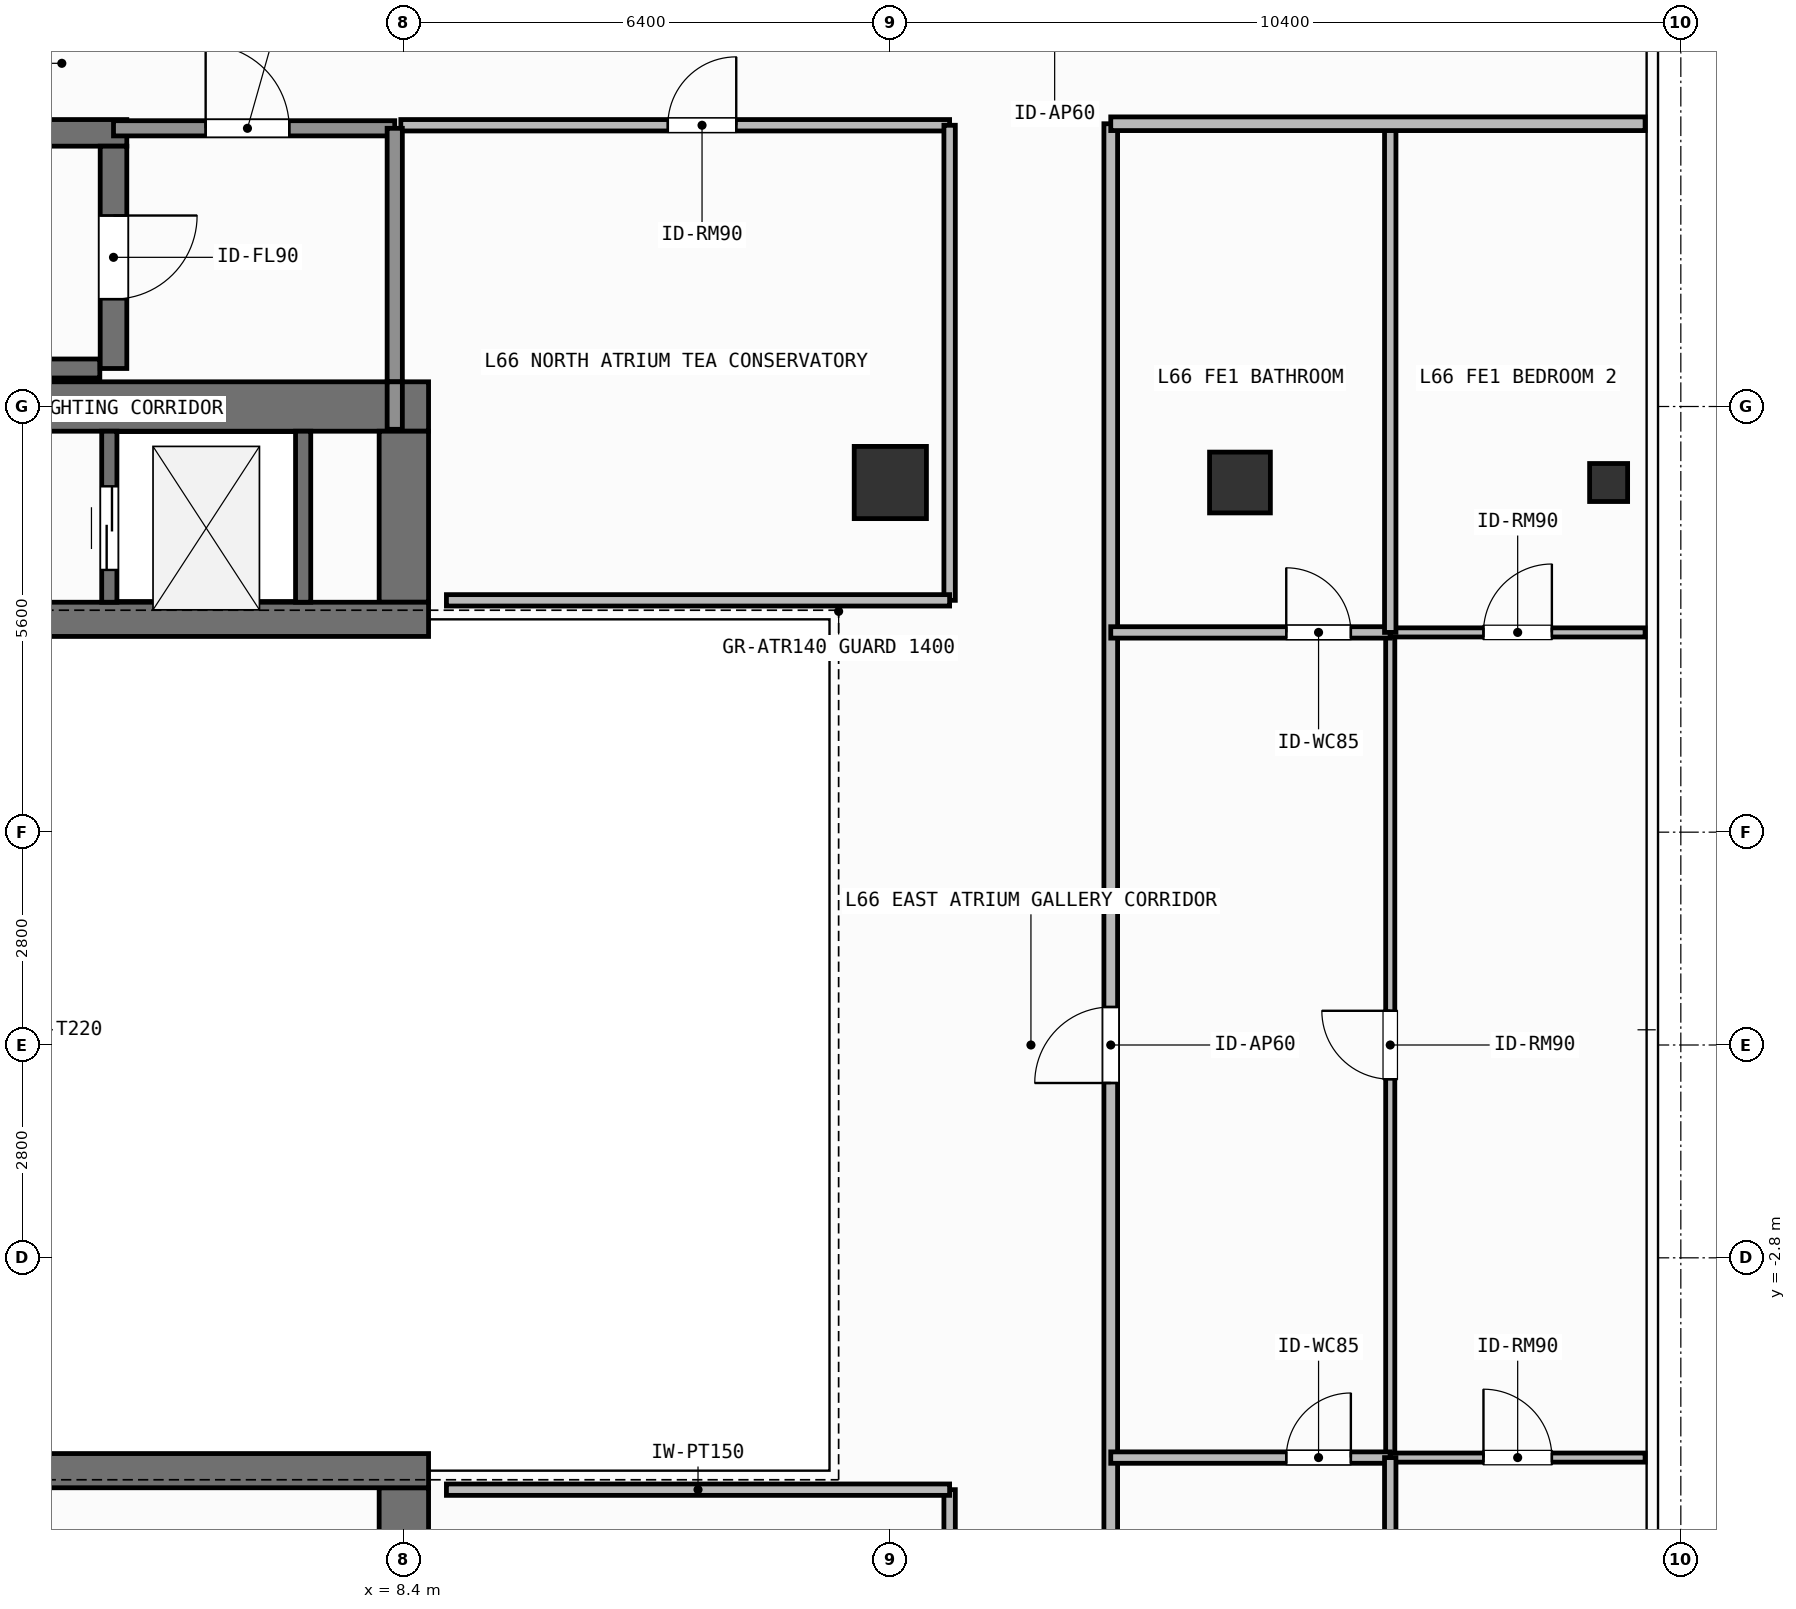
"""IFC4 building model, lengths in metres.
Left out: names, types, materials, properties, quantities, classifications, styles, units other than length and angle.
Written with IfcOpenShell. Run it as: python <this file> out.ifc"""

import sys

from ifc_helpers import new_model, si_unit, direction, frame, frame_2d, origin, origin_2d, place, context, subcontext, project, spatial, rectangle, hollow_rectangle, extrude, element, fill, save


model = new_model("IFC4")
c1 = context("Model", 3, precision=1e-05, world=origin(), true_north=direction((0.0, 1.0)))
c2 = subcontext(c1, "Body", "Model", "MODEL_VIEW")
j1 = project(units=[si_unit("LENGTHUNIT", "METRE"), si_unit("PLANEANGLEUNIT", "RADIAN")], contexts=[c1])
p1 = place(None, origin())
s1 = spatial("IfcSite", under=j1, at=p1, CompositionType="ELEMENT")
p2 = place(p1, origin())
s2 = spatial("IfcBuilding", under=s1, at=p2, CompositionType="ELEMENT")
p3 = place(p2, frame((0.0, 0.0, 270.3)))
s3 = spatial("IfcBuildingStorey", under=s2, at=p3, CompositionType="ELEMENT", Elevation=270.3)
p4 = place(p3, frame((-7.55, 8.4, 0.0), z_axis=(0.0, 0.0, 1.0), x_axis=(1.0, 0.0, 0.0)))
e1 = element("IfcWall", 1, at=p4, inside=s3, PredefinedType="SHEAR", context=c2, shape_type="SweptSolid", body=[
    extrude(rectangle(XDim=16.275, YDim=0.65, at=frame_2d((8.138, 0.0))), origin(), (0.0, 0.0, 1.0), 3.9),
])
for number, where, z_axis, x_axis in (
    (2, (8.4, -8.075, 0.0), (0.0, 0.0, 1.0), (0.0, 1.0, 0.0)),
    (3, (8.4, 5.825, 0.0), (0.0, 0.0, 1.0), (0.0, 1.0, 0.0)),
):
    element("IfcWall", number, at=place(p3, frame(where, z_axis=z_axis, x_axis=x_axis)), inside=s3, PredefinedType="SHEAR", context=c2, shape_type="SweptSolid", body=[
        extrude(rectangle(XDim=2.25, YDim=0.65, at=frame_2d((1.125, 0.0))), origin(), (0.0, 0.0, 1.0), 3.9),
    ])
for number, where, z_axis, x_axis in (
    (4, (3.045, -5.6, 0.0), (0.0, 0.0, 1.0), (1.0, 0.0, 0.0)),
    (5, (3.045, 5.6, 0.0), (0.0, 0.0, 1.0), (1.0, 0.0, 0.0)),
):
    element("IfcWall", number, at=place(p3, frame(where, z_axis=z_axis, x_axis=x_axis)), inside=s3, PredefinedType="SHEAR", context=c2, shape_type="SweptSolid", body=[
        extrude(rectangle(XDim=5.68, YDim=0.45, at=frame_2d((2.84, 0.0))), origin(), (0.0, 0.0, 1.0), 3.9),
    ])
p5 = place(p3, frame((-2.555, 12.0, 0.0), z_axis=(0.0, 0.0, 1.0), x_axis=(1.0, 0.0, 0.0)))
e6 = element("IfcWall", 6, at=p5, inside=s3, PredefinedType="SHEAR", context=c2, shape_type="SweptSolid", body=[
    extrude(rectangle(XDim=7.31, YDim=0.35, at=frame_2d((3.655, 0.0))), origin(), (0.0, 0.0, 1.0), 3.9),
])
p6 = place(p3, frame((-2.2, 8.9, 0.0), z_axis=(0.0, 0.0, 1.0), x_axis=(1.0, 0.0, 0.0)))
e7 = element("IfcWall", 7, at=p6, inside=s3, PredefinedType="SHEAR", context=c2, shape_type="SweptSolid", body=[
    extrude(rectangle(XDim=6.6, YDim=0.25, at=frame_2d((3.3, 0.0))), origin(), (0.0, 0.0, 1.0), 3.9),
])
p7 = place(p3, frame((4.58, 11.825, 0.0), z_axis=(0.0, 0.0, 1.0), x_axis=(0.0, -1.0, 0.0)))
e8 = element("IfcWall", 8, at=p7, inside=s3, PredefinedType="SHEAR", context=c2, shape_type="SweptSolid", body=[
    extrude(rectangle(XDim=2.925, YDim=0.35, at=frame_2d((1.462, 0.0))), origin(), (0.0, 0.0, 1.0), 3.9),
])
p8 = place(p7, frame((0.913, 0.0, 0.0)))
e9 = element("IfcOpeningElement", 9, at=p8, cuts=e8, PredefinedType="OPENING", context=c2, shape_type="SweptSolid", body=[
    extrude(rectangle(XDim=1.1, YDim=2.15, at=frame_2d((0.55, 1.075))), frame((0.0, 0.185, 0.0), z_axis=(0.0, -1.0, 0.0), x_axis=(1.0, 0.0, 0.0)), (0.0, 0.0, 1.0), 0.37),
])
p9 = place(p3, frame((14.8, 7.4, 0.0), z_axis=(0.0, 0.0, 1.0), x_axis=(1.0, 0.0, 0.0)))
e10 = element("IfcColumn", 10, at=p9, inside=s3, PredefinedType="COLUMN", context=c2, shape_type="SweptSolid", body=[
    extrude(rectangle(XDim=0.95, YDim=0.95, at=origin_2d()), origin(), (0.0, 0.0, 1.0), 3.9),
])
p10 = place(p3, frame((19.4, 7.4, 0.0), z_axis=(0.0, 0.0, 1.0), x_axis=(1.0, 0.0, 0.0)))
e11 = element("IfcColumn", 11, at=p10, inside=s3, PredefinedType="COLUMN", context=c2, shape_type="SweptSolid", body=[
    extrude(hollow_rectangle(XDim=0.8, YDim=0.8, WallThickness=0.036, at=origin_2d()), origin(), (0.0, 0.0, 1.0), 3.9),
])
p11 = place(p3, frame((24.25, 7.4, 0.0), z_axis=(0.0, 0.0, 1.0), x_axis=(1.0, 0.0, 0.0)))
e12 = element("IfcColumn", 12, at=p11, inside=s3, PredefinedType="COLUMN", context=c2, shape_type="SweptSolid", body=[
    extrude(hollow_rectangle(XDim=0.5, YDim=0.5, WallThickness=0.025, at=origin_2d()), origin(), (0.0, 0.0, 1.0), 3.9),
])
p12 = place(p3, frame((4.525, 5.825, 0.0), z_axis=(0.0, 0.0, 1.0), x_axis=(0.0, 1.0, 0.0)))
e13 = element("IfcWall", 13, at=p12, inside=s3, PredefinedType="SHEAR", context=c2, shape_type="SweptSolid", body=[
    extrude(rectangle(XDim=2.25, YDim=0.2, at=frame_2d((1.125, 0.0))), origin(), (0.0, 0.0, 1.0), 3.68),
])
p13 = place(p12, frame((0.425, 0.0, 0.0)))
e14 = element("IfcOpeningElement", 14, at=p13, cuts=e13, PredefinedType="OPENING", context=c2, shape_type="SweptSolid", body=[
    extrude(rectangle(XDim=1.1, YDim=2.2, at=frame_2d((0.55, 1.1))), frame((0.0, 0.11, 0.0), z_axis=(0.0, -1.0, 0.0), x_axis=(1.0, 0.0, 0.0)), (0.0, 0.0, 1.0), 0.22),
])
p14 = place(p3, frame((7.075, 5.825, 0.0), z_axis=(0.0, 0.0, 1.0), x_axis=(0.0, 1.0, 0.0)))
e15 = element("IfcWall", 15, at=p14, inside=s3, PredefinedType="SHEAR", context=c2, shape_type="SweptSolid", body=[
    extrude(rectangle(XDim=2.25, YDim=0.2, at=frame_2d((1.125, 0.0))), origin(), (0.0, 0.0, 1.0), 3.68),
])
p15 = place(p3, frame((4.58, 12.06, 0.0), z_axis=(0.0, 0.0, 1.0), x_axis=(1.0, 0.0, 0.0)))
e16 = element("IfcWall", 16, at=p15, inside=s3, PredefinedType="SOLIDWALL", context=c2, shape_type="SweptSolid", body=[
    extrude(rectangle(XDim=3.7, YDim=0.2, at=frame_2d((1.85, 0.0))), origin(), (0.0, 0.0, 1.0), 3.68),
])
p16 = place(p15, frame((1.212, 0.0, 0.0)))
e17 = element("IfcOpeningElement", 17, at=p16, cuts=e16, PredefinedType="OPENING", context=c2, shape_type="SweptSolid", body=[
    extrude(rectangle(XDim=1.1, YDim=2.15, at=frame_2d((0.55, 1.075))), frame((0.0, 0.11, 0.0), z_axis=(0.0, -1.0, 0.0), x_axis=(1.0, 0.0, 0.0)), (0.0, 0.0, 1.0), 0.22),
])
p17 = place(p3, frame((8.36, 12.1, 0.0), z_axis=(0.0, 0.0, 1.0), x_axis=(1.0, 0.0, 0.0)))
e18 = element("IfcWall", 18, at=p17, inside=s3, PredefinedType="PARTITIONING", context=c2, shape_type="SweptSolid", body=[
    extrude(rectangle(XDim=7.22, YDim=0.15, at=frame_2d((3.61, 0.0))), origin(), (0.0, 0.0, 1.0), 3.68),
])
p18 = place(p17, frame((3.513, 0.0, 0.0)))
e19 = element("IfcOpeningElement", 19, at=p18, cuts=e18, PredefinedType="OPENING", context=c2, shape_type="SweptSolid", body=[
    extrude(rectangle(XDim=0.9, YDim=2.1, at=frame_2d((0.45, 1.05))), frame((0.0, 0.085, 0.0), z_axis=(0.0, -1.0, 0.0), x_axis=(1.0, 0.0, 0.0)), (0.0, 0.0, 1.0), 0.17),
])
p19 = place(p3, frame((17.7, -12.12, 0.0), z_axis=(0.0, 0.0, 1.0), x_axis=(0.0, 1.0, 0.0)))
e20 = element("IfcWall", 20, at=p19, inside=s3, PredefinedType="PARTITIONING", context=c2, shape_type="SweptSolid", body=[
    extrude(rectangle(XDim=24.24, YDim=0.18, at=frame_2d((12.12, 0.0))), origin(), (0.0, 0.0, 1.0), 3.68),
])
p20 = place(p19, frame((11.62, 0.0, 0.0)))
e21 = element("IfcOpeningElement", 21, at=p20, cuts=e20, PredefinedType="OPENING", context=c2, shape_type="SweptSolid", body=[
    extrude(rectangle(XDim=1.0, YDim=2.2, at=frame_2d((0.5, 1.1))), frame((0.0, 0.1, 0.0), z_axis=(0.0, -1.0, 0.0), x_axis=(1.0, 0.0, 0.0)), (0.0, 0.0, 1.0), 0.2),
])
p21 = place(p3, frame((21.377, -5.428, 0.0), z_axis=(0.0, 0.0, 1.0), x_axis=(0.0, 1.0, 0.0)))
e22 = element("IfcWall", 22, at=p21, inside=s3, PredefinedType="PARTITIONING", context=c2, shape_type="SweptSolid", body=[
    extrude(rectangle(XDim=10.856, YDim=0.12, at=frame_2d((5.428, 0.0))), origin(), (0.0, 0.0, 1.0), 3.68),
])
p22 = place(p21, frame((4.978, 0.0, 0.0)))
e23 = element("IfcOpeningElement", 23, at=p22, cuts=e22, PredefinedType="OPENING", context=c2, shape_type="SweptSolid", body=[
    extrude(rectangle(XDim=0.9, YDim=2.1, at=frame_2d((0.45, 1.05))), frame((0.0, 0.07, 0.0), z_axis=(0.0, -1.0, 0.0), x_axis=(1.0, 0.0, 0.0)), (0.0, 0.0, 1.0), 0.14),
])
p23 = place(p3, frame((17.7, 5.428, 0.0), z_axis=(0.0, 0.0, 1.0), x_axis=(1.0, 0.0, 0.0)))
e24 = element("IfcWall", 24, at=p23, inside=s3, PredefinedType="PARTITIONING", context=c2, shape_type="SweptSolid", body=[
    extrude(rectangle(XDim=3.677, YDim=0.15, at=frame_2d((1.838, 0.0))), origin(), (0.0, 0.0, 1.0), 3.68),
])
p24 = place(p23, frame((2.309, 0.0, 0.0)))
e25 = element("IfcOpeningElement", 25, at=p24, cuts=e24, PredefinedType="OPENING", context=c2, shape_type="SweptSolid", body=[
    extrude(rectangle(XDim=0.85, YDim=2.1, at=frame_2d((0.425, 1.05))), frame((0.0, 0.085, 0.0), z_axis=(0.0, -1.0, 0.0), x_axis=(1.0, 0.0, 0.0)), (0.0, 0.0, 1.0), 0.17),
])
p25 = place(p3, frame((17.7, -5.428, 0.0), z_axis=(0.0, 0.0, 1.0), x_axis=(1.0, 0.0, 0.0)))
e26 = element("IfcWall", 26, at=p25, inside=s3, PredefinedType="PARTITIONING", context=c2, shape_type="SweptSolid", body=[
    extrude(rectangle(XDim=3.677, YDim=0.15, at=frame_2d((1.838, 0.0))), origin(), (0.0, 0.0, 1.0), 3.68),
])
p26 = place(p25, frame((2.309, 0.0, 0.0)))
e27 = element("IfcOpeningElement", 27, at=p26, cuts=e26, PredefinedType="OPENING", context=c2, shape_type="SweptSolid", body=[
    extrude(rectangle(XDim=0.85, YDim=2.1, at=frame_2d((0.425, 1.05))), frame((0.0, 0.085, 0.0), z_axis=(0.0, -1.0, 0.0), x_axis=(1.0, 0.0, 0.0)), (0.0, 0.0, 1.0), 0.17),
])
p27 = place(p3, frame((21.377, -5.428, 0.0), z_axis=(0.0, 0.0, 1.0), x_axis=(1.0, 0.0, 0.0)))
e28 = element("IfcWall", 28, at=p27, inside=s3, PredefinedType="PARTITIONING", context=c2, shape_type="SweptSolid", body=[
    extrude(rectangle(XDim=3.353, YDim=0.12, at=frame_2d((1.677, 0.0))), origin(), (0.0, 0.0, 1.0), 3.68),
])
p28 = place(p27, frame((1.227, 0.0, 0.0)))
e29 = element("IfcOpeningElement", 29, at=p28, cuts=e28, PredefinedType="OPENING", context=c2, shape_type="SweptSolid", body=[
    extrude(rectangle(XDim=0.9, YDim=2.1, at=frame_2d((0.45, 1.05))), frame((0.0, 0.07, 0.0), z_axis=(0.0, -1.0, 0.0), x_axis=(1.0, 0.0, 0.0)), (0.0, 0.0, 1.0), 0.14),
])
p29 = place(p3, frame((21.377, 5.428, 0.0), z_axis=(0.0, 0.0, 1.0), x_axis=(1.0, 0.0, 0.0)))
e30 = element("IfcWall", 30, at=p29, inside=s3, PredefinedType="PARTITIONING", context=c2, shape_type="SweptSolid", body=[
    extrude(rectangle(XDim=3.353, YDim=0.12, at=frame_2d((1.677, 0.0))), origin(), (0.0, 0.0, 1.0), 3.68),
])
p30 = place(p29, frame((1.227, 0.0, 0.0)))
e31 = element("IfcOpeningElement", 31, at=p30, cuts=e30, PredefinedType="OPENING", context=c2, shape_type="SweptSolid", body=[
    extrude(rectangle(XDim=0.9, YDim=2.1, at=frame_2d((0.45, 1.05))), frame((0.0, 0.07, 0.0), z_axis=(0.0, -1.0, 0.0), x_axis=(1.0, 0.0, 0.0)), (0.0, 0.0, 1.0), 0.14),
])
p31 = place(p3, frame((8.28, 8.725, 0.0), z_axis=(0.0, 0.0, 1.0), x_axis=(0.0, 1.0, 0.0)))
e32 = element("IfcWall", 32, at=p31, inside=s3, PredefinedType="SOLIDWALL", context=c2, shape_type="SweptSolid", body=[
    extrude(rectangle(XDim=3.335, YDim=0.2, at=frame_2d((1.667, 0.0))), origin(), (0.0, 0.0, 1.0), 3.68),
])
p32 = place(p3, frame((15.58, -12.1, 0.0), z_axis=(0.0, 0.0, 1.0), x_axis=(0.0, 1.0, 0.0)))
e33 = element("IfcWall", 33, at=p32, inside=s3, PredefinedType="PARTITIONING", context=c2, shape_type="SweptSolid", body=[
    extrude(rectangle(XDim=6.25, YDim=0.15, at=frame_2d((3.125, 0.0))), origin(), (0.0, 0.0, 1.0), 3.68),
])
p33 = place(p3, frame((8.96, -5.85, 0.0), z_axis=(0.0, 0.0, 1.0), x_axis=(1.0, 0.0, 0.0)))
e34 = element("IfcWall", 34, at=p33, inside=s3, PredefinedType="PARTITIONING", context=c2, shape_type="SweptSolid", body=[
    extrude(rectangle(XDim=6.62, YDim=0.15, at=frame_2d((3.31, 0.0))), origin(), (0.0, 0.0, 1.0), 3.68),
])
p34 = place(p3, frame((8.28, 8.1, 0.0), z_axis=(0.0, 0.0, 1.0), x_axis=(0.0, 1.0, 0.0)))
e35 = element("IfcWall", 35, at=p34, inside=s3, PredefinedType="SOLIDWALL", context=c2, shape_type="SweptSolid", body=[
    extrude(rectangle(XDim=0.625, YDim=0.2, at=frame_2d((0.312, 0.0))), origin(), (0.0, 0.0, 1.0), 3.68),
])
p35 = place(p3, frame((15.58, 5.85, 0.0), z_axis=(0.0, 0.0, 1.0), x_axis=(0.0, 1.0, 0.0)))
e36 = element("IfcWall", 36, at=p35, inside=s3, PredefinedType="PARTITIONING", context=c2, shape_type="SweptSolid", body=[
    extrude(rectangle(XDim=6.25, YDim=0.15, at=frame_2d((3.125, 0.0))), origin(), (0.0, 0.0, 1.0), 3.68),
])
p36 = place(p3, frame((8.96, 5.85, 0.0), z_axis=(0.0, 0.0, 1.0), x_axis=(1.0, 0.0, 0.0)))
e37 = element("IfcWall", 37, at=p36, inside=s3, PredefinedType="PARTITIONING", context=c2, shape_type="SweptSolid", body=[
    extrude(rectangle(XDim=6.62, YDim=0.15, at=frame_2d((3.31, 0.0))), origin(), (0.0, 0.0, 1.0), 3.68),
])
for number, where, z_axis, x_axis in (
    (38, (21.377, -12.12, 0.0), (0.0, 0.0, 1.0), (0.0, 1.0, 0.0)),
    (39, (21.377, 5.428, 0.0), (0.0, 0.0, 1.0), (0.0, 1.0, 0.0)),
):
    element("IfcWall", number, at=place(p3, frame(where, z_axis=z_axis, x_axis=x_axis)), inside=s3, PredefinedType="PARTITIONING", context=c2, shape_type="SweptSolid", body=[
        extrude(rectangle(XDim=6.692, YDim=0.15, at=frame_2d((3.346, 0.0))), origin(), (0.0, 0.0, 1.0), 3.68),
    ])
p37 = place(p3, frame((17.7, 12.12, 0.0), z_axis=(0.0, 0.0, 1.0), x_axis=(1.0, 0.0, 0.0)))
e40 = element("IfcWall", 40, at=p37, inside=s3, PredefinedType="PARTITIONING", context=c2, shape_type="SweptSolid", body=[
    extrude(rectangle(XDim=7.03, YDim=0.18, at=frame_2d((3.515, 0.0))), origin(), (0.0, 0.0, 1.0), 3.68),
])
p38 = place(p13, origin())
e41 = element("IfcDoor", 41, at=p38, inside=s3, OperationType="SLIDING_TO_LEFT", PredefinedType="DOOR", context=c2, shape_type="SweptSolid", body=[
    extrude(rectangle(XDim=1.1, YDim=2.2, at=frame_2d((0.55, 1.1))), frame((0.0, 0.025, 0.0), z_axis=(0.0, -1.0, 0.0), x_axis=(1.0, 0.0, 0.0)), (0.0, 0.0, 1.0), 0.05),
])
fill(e14, e41)
p39 = place(p8, origin())
e42 = element("IfcDoor", 42, at=p39, inside=s3, OperationType="SINGLE_SWING_LEFT", PredefinedType="DOOR", context=c2, shape_type="SweptSolid", body=[
    extrude(rectangle(XDim=1.1, YDim=2.15, at=frame_2d((0.55, 1.075))), frame((0.0, 0.025, 0.0), z_axis=(0.0, -1.0, 0.0), x_axis=(1.0, 0.0, 0.0)), (0.0, 0.0, 1.0), 0.05),
])
fill(e9, e42)
p40 = place(p16, origin())
e43 = element("IfcDoor", 43, at=p40, inside=s3, OperationType="SINGLE_SWING_LEFT", PredefinedType="DOOR", context=c2, shape_type="SweptSolid", body=[
    extrude(rectangle(XDim=1.1, YDim=2.15, at=frame_2d((0.55, 1.075))), frame((0.0, 0.025, 0.0), z_axis=(0.0, -1.0, 0.0), x_axis=(1.0, 0.0, 0.0)), (0.0, 0.0, 1.0), 0.05),
])
fill(e17, e43)
p41 = place(p18, origin())
e44 = element("IfcDoor", 44, at=p41, inside=s3, OperationType="SINGLE_SWING_RIGHT", PredefinedType="DOOR", context=c2, shape_type="SweptSolid", body=[
    extrude(rectangle(XDim=0.9, YDim=2.1, at=frame_2d((0.45, 1.05))), frame((0.0, 0.025, 0.0), z_axis=(0.0, -1.0, 0.0), x_axis=(1.0, 0.0, 0.0)), (0.0, 0.0, 1.0), 0.05),
])
fill(e19, e44)
p42 = place(p20, origin())
e45 = element("IfcDoor", 45, at=p42, inside=s3, OperationType="SINGLE_SWING_LEFT", PredefinedType="DOOR", context=c2, shape_type="SweptSolid", body=[
    extrude(rectangle(XDim=1.0, YDim=2.2, at=frame_2d((0.5, 1.1))), frame((0.0, 0.025, 0.0), z_axis=(0.0, -1.0, 0.0), x_axis=(1.0, 0.0, 0.0)), (0.0, 0.0, 1.0), 0.05),
])
fill(e21, e45)
p43 = place(p22, origin())
e46 = element("IfcDoor", 46, at=p43, inside=s3, OperationType="SINGLE_SWING_RIGHT", PredefinedType="DOOR", context=c2, shape_type="SweptSolid", body=[
    extrude(rectangle(XDim=0.9, YDim=2.1, at=frame_2d((0.45, 1.05))), frame((0.0, 0.025, 0.0), z_axis=(0.0, -1.0, 0.0), x_axis=(1.0, 0.0, 0.0)), (0.0, 0.0, 1.0), 0.05),
])
fill(e23, e46)
p44 = place(p24, origin())
e47 = element("IfcDoor", 47, at=p44, inside=s3, OperationType="SINGLE_SWING_LEFT", PredefinedType="DOOR", context=c2, shape_type="SweptSolid", body=[
    extrude(rectangle(XDim=0.85, YDim=2.1, at=frame_2d((0.425, 1.05))), frame((0.0, 0.025, 0.0), z_axis=(0.0, -1.0, 0.0), x_axis=(1.0, 0.0, 0.0)), (0.0, 0.0, 1.0), 0.05),
])
fill(e25, e47)
p45 = place(p26, origin())
e48 = element("IfcDoor", 48, at=p45, inside=s3, OperationType="SINGLE_SWING_RIGHT", PredefinedType="DOOR", context=c2, shape_type="SweptSolid", body=[
    extrude(rectangle(XDim=0.85, YDim=2.1, at=frame_2d((0.425, 1.05))), frame((0.0, 0.025, 0.0), z_axis=(0.0, -1.0, 0.0), x_axis=(1.0, 0.0, 0.0)), (0.0, 0.0, 1.0), 0.05),
])
fill(e27, e48)
p46 = place(p28, origin())
e49 = element("IfcDoor", 49, at=p46, inside=s3, OperationType="SINGLE_SWING_LEFT", PredefinedType="DOOR", context=c2, shape_type="SweptSolid", body=[
    extrude(rectangle(XDim=0.9, YDim=2.1, at=frame_2d((0.45, 1.05))), frame((0.0, 0.025, 0.0), z_axis=(0.0, -1.0, 0.0), x_axis=(1.0, 0.0, 0.0)), (0.0, 0.0, 1.0), 0.05),
])
fill(e29, e49)
p47 = place(p30, origin())
e50 = element("IfcDoor", 50, at=p47, inside=s3, OperationType="SINGLE_SWING_RIGHT", PredefinedType="DOOR", context=c2, shape_type="SweptSolid", body=[
    extrude(rectangle(XDim=0.9, YDim=2.1, at=frame_2d((0.45, 1.05))), frame((0.0, 0.025, 0.0), z_axis=(0.0, -1.0, 0.0), x_axis=(1.0, 0.0, 0.0)), (0.0, 0.0, 1.0), 0.05),
])
fill(e31, e50)
save(model, sys.argv[1])
